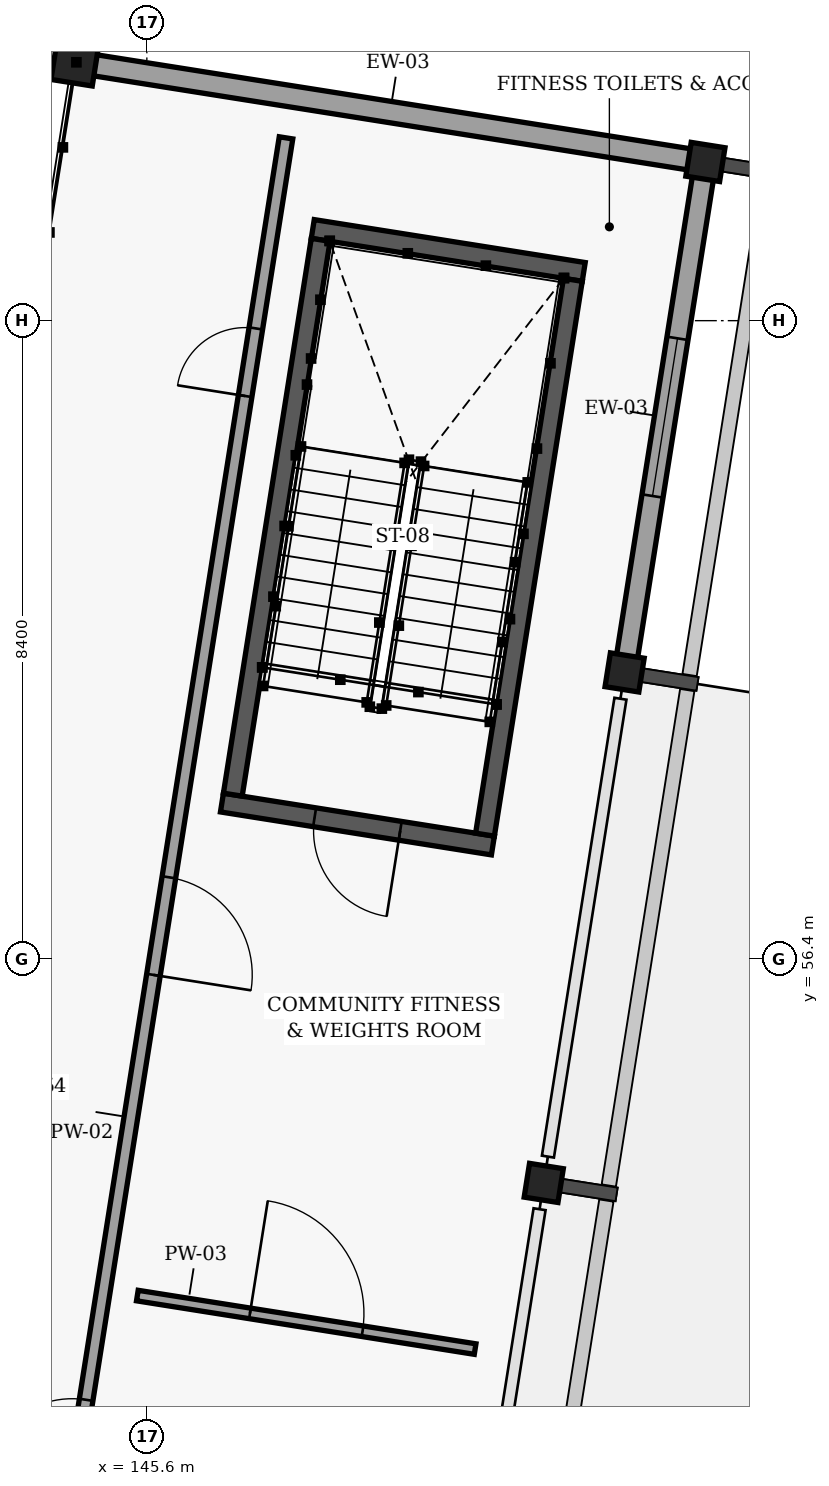
"""IFC4 building model, lengths in metres.
Left out: names, types, materials, properties, quantities, classifications, styles, units other than length and angle.
Written with IfcOpenShell. Run it as: python <this file> out.ifc"""

import sys

from ifc_helpers import new_model, si_unit, direction, frame, frame_2d, origin, origin_2d, place, context, subcontext, project, spatial, rectangle, extrude, element, fill, save


model = new_model("IFC4")
c1 = context("Model", 3, precision=1e-05, world=origin(), true_north=direction((0.0, 1.0)))
c2 = subcontext(c1, "Body", "Model", "MODEL_VIEW")
j1 = project(units=[si_unit("LENGTHUNIT", "METRE"), si_unit("PLANEANGLEUNIT", "RADIAN")], contexts=[c1])
p1 = place(None, origin())
s1 = spatial("IfcSite", under=j1, at=p1, CompositionType="ELEMENT")
p2 = place(p1, origin())
s2 = spatial("IfcBuilding", under=s1, at=p2, CompositionType="ELEMENT")
p3 = place(p2, frame((0.0, 0.0, 4.8)))
s3 = spatial("IfcBuildingStorey", under=s2, at=p3, CompositionType="ELEMENT", Elevation=4.8)
p4 = place(p3, frame((144.653, 68.202, 0.0), z_axis=(0.0, 0.0, 1.0), x_axis=(0.987688340595, -0.15643446504, 0.0)))
e1 = element("IfcColumn", 1, at=p4, inside=s3, PredefinedType="COLUMN", context=c2, shape_type="SweptSolid", body=[
    extrude(rectangle(XDim=0.55, YDim=0.55, at=origin_2d()), origin(), (0.0, 0.0, 1.0), 4.2),
])
for number, where, z_axis, x_axis in (
    (2, (150.822, 53.456, 0.0), (0.0, 0.0, 1.0), (0.988, -0.156, 0.0)),
    (3, (151.886, 60.172, 0.0), (0.0, 0.0, 1.0), (0.988, -0.156, 0.0)),
    (4, (152.949, 66.888, 0.0), (0.0, 0.0, 1.0), (0.988, -0.156, 0.0)),
):
    element("IfcColumn", number, at=place(p3, frame(where, z_axis=z_axis, x_axis=x_axis)), inside=s3, PredefinedType="COLUMN", context=c2, shape_type="SweptSolid", body=[
        extrude(rectangle(XDim=0.45, YDim=0.45, at=origin_2d()), origin(), (0.0, 0.0, 1.0), 4.2),
    ])
p5 = place(p3, frame((151.901, 60.271, 0.0), z_axis=(0.0, 0.0, 1.0), x_axis=(0.156536171909, 0.987672226442, 0.0)))
e5 = element("IfcWall", 5, at=p5, inside=s3, PredefinedType="SOLIDWALL", context=c2, shape_type="SweptSolid", body=[
    extrude(rectangle(XDim=6.6, YDim=0.28, at=frame_2d((3.3, 0.0))), origin(), (0.0, 0.0, 1.0), 3.328),
])
p6 = place(p5, frame((2.25, 0.0, 1.308)))
e6 = element("IfcOpeningElement", 6, at=p6, cuts=e5, PredefinedType="OPENING", context=c2, shape_type="SweptSolid", body=[
    extrude(rectangle(XDim=2.1, YDim=1.8, at=frame_2d((1.05, 0.9))), frame((0.0, 0.15, 0.0), z_axis=(0.0, -1.0, 0.0), x_axis=(1.0, 0.0, 0.0)), (0.0, 0.0, 1.0), 0.3),
])
p7 = place(p3, frame((144.732, 68.189, 0.0), z_axis=(0.0, 0.0, 1.0), x_axis=(0.987704756752, -0.156330782283, 0.0)))
e7 = element("IfcWall", 7, at=p7, inside=s3, PredefinedType="SOLIDWALL", context=c2, shape_type="SweptSolid", body=[
    extrude(rectangle(XDim=8.24, YDim=0.28, at=frame_2d((4.12, 0.0))), origin(), (0.0, 0.0, 1.0), 3.406),
])
p8 = place(p3, frame((144.666, 68.281, 0.0), z_axis=(0.0, 0.0, 1.0), x_axis=(0.15632126228, 0.987706263501, 0.0)))
e8 = element("IfcWall", 8, at=p8, inside=s3, PredefinedType="SOLIDWALL", context=c2, shape_type="SweptSolid", body=[
    extrude(rectangle(XDim=6.641, YDim=0.28, at=frame_2d((3.32, 0.0))), origin(), (0.0, 0.0, 1.0), 3.535),
])
p9 = place(p3, frame((150.153, 57.895, 0.0), z_axis=(0.0, 0.0, 1.0), x_axis=(-0.987676717047, 0.156507835599, 0.0)))
e9 = element("IfcWall", 9, at=p9, inside=s3, PredefinedType="SHEAR", context=c2, shape_type="SweptSolid", body=[
    extrude(rectangle(XDim=3.61, YDim=0.25, at=frame_2d((1.805, 0.0))), origin(), (0.0, 0.0, 1.0), 3.96),
])
p10 = place(p9, frame((1.235, 0.0, 0.0)))
e10 = element("IfcOpeningElement", 10, at=p10, cuts=e9, PredefinedType="OPENING", context=c2, shape_type="SweptSolid", body=[
    extrude(rectangle(XDim=1.14, YDim=2.15, at=frame_2d((0.57, 1.075))), frame((0.0, 0.135, 0.0), z_axis=(0.0, -1.0, 0.0), x_axis=(1.0, 0.0, 0.0)), (0.0, 0.0, 1.0), 0.27),
])
p11 = place(p3, frame((147.783, 66.006, 0.0), z_axis=(0.0, 0.0, 1.0), x_axis=(0.987664601714, -0.156584272906, 0.0)))
e11 = element("IfcWall", 11, at=p11, inside=s3, PredefinedType="SHEAR", context=c2, shape_type="SweptSolid", body=[
    extrude(rectangle(XDim=3.609, YDim=0.25, at=frame_2d((1.805, 0.0))), origin(), (0.0, 0.0, 1.0), 3.96),
])
p12 = place(p3, frame((146.731, 58.564, 0.0), z_axis=(0.0, 0.0, 1.0), x_axis=(0.15642738738, 0.98768946156, 0.0)))
e12 = element("IfcWall", 12, at=p12, inside=s3, PredefinedType="SHEAR", context=c2, shape_type="SweptSolid", body=[
    extrude(rectangle(XDim=7.39, YDim=0.25, at=frame_2d((3.695, 0.0))), origin(), (0.0, 0.0, 1.0), 3.96),
])
p13 = place(p3, frame((151.205, 65.337, 0.0), z_axis=(0.0, 0.0, 1.0), x_axis=(-0.156432491725, -0.987688653136, 0.0)))
e13 = element("IfcWall", 13, at=p13, inside=s3, PredefinedType="SHEAR", context=c2, shape_type="SweptSolid", body=[
    extrude(rectangle(XDim=7.39, YDim=0.25, at=frame_2d((3.695, 0.0))), origin(), (0.0, 0.0, 1.0), 3.96),
])
p14 = place(p3, frame((143.348, 41.427, 0.0), z_axis=(0.0, 0.0, 1.0), x_axis=(0.156440506918, 0.987687383637, 0.0)))
e14 = element("IfcWall", 14, at=p14, inside=s3, PredefinedType="PARTITIONING", context=c2, shape_type="SweptSolid", body=[
    extrude(rectangle(XDim=26.099, YDim=0.18, at=frame_2d((13.05, 0.0))), origin(), (0.0, 0.0, 1.0), 3.406),
])
p15 = place(p14, frame((8.11, 0.0, 0.0)))
e15 = element("IfcOpeningElement", 15, at=p15, cuts=e14, PredefinedType="OPENING", context=c2, shape_type="SweptSolid", body=[
    extrude(rectangle(XDim=1.18, YDim=2.18, at=frame_2d((0.59, 1.09))), frame((0.0, 0.1, 0.0), z_axis=(0.0, -1.0, 0.0), x_axis=(1.0, 0.0, 0.0)), (0.0, 0.0, 1.0), 0.2),
])
p16 = place(p14, frame((14.95, 0.0, 0.0)))
e16 = element("IfcOpeningElement", 16, at=p16, cuts=e14, PredefinedType="OPENING", context=c2, shape_type="SweptSolid", body=[
    extrude(rectangle(XDim=1.3, YDim=2.2, at=frame_2d((0.65, 1.1))), frame((0.0, 0.1, 0.0), z_axis=(0.0, -1.0, 0.0), x_axis=(1.0, 0.0, 0.0)), (0.0, 0.0, 1.0), 0.2),
])
p17 = place(p14, frame((22.661, 0.0, 0.0)))
e17 = element("IfcOpeningElement", 17, at=p17, cuts=e14, PredefinedType="OPENING", context=c2, shape_type="SweptSolid", body=[
    extrude(rectangle(XDim=0.9, YDim=2.06, at=frame_2d((0.45, 1.03))), frame((0.0, 0.1, 0.0), z_axis=(0.0, -1.0, 0.0), x_axis=(1.0, 0.0, 0.0)), (0.0, 0.0, 1.0), 0.2),
])
p18 = place(p3, frame((145.475, 51.974, 0.0), z_axis=(0.0, 0.0, 1.0), x_axis=(0.987679230443, -0.156491973442, 0.0)))
e18 = element("IfcWall", 18, at=p18, inside=s3, PredefinedType="PARTITIONING", context=c2, shape_type="SweptSolid", body=[
    extrude(rectangle(XDim=4.499, YDim=0.14, at=frame_2d((2.25, 0.0))), origin(), (0.0, 0.0, 1.0), 3.535),
])
p19 = place(p18, frame((1.5, 0.0, 0.0)))
e19 = element("IfcOpeningElement", 19, at=p19, cuts=e18, PredefinedType="OPENING", context=c2, shape_type="SweptSolid", body=[
    extrude(rectangle(XDim=1.5, YDim=2.25, at=frame_2d((0.75, 1.125))), frame((0.0, 0.08, 0.0), z_axis=(0.0, -1.0, 0.0), x_axis=(1.0, 0.0, 0.0)), (0.0, 0.0, 1.0), 0.16),
])
p20 = place(p6, origin())
e20 = element("IfcWindow", 20, at=p20, inside=s3, PartitioningType="SINGLE_PANEL", PredefinedType="WINDOW", context=c2, shape_type="SweptSolid", body=[
    extrude(rectangle(XDim=2.1, YDim=1.8, at=frame_2d((1.05, 0.9))), frame((0.0, 0.03, 0.0), z_axis=(0.0, -1.0, 0.0), x_axis=(1.0, 0.0, 0.0)), (0.0, 0.0, 1.0), 0.06),
])
fill(e6, e20)
p21 = place(p10, origin())
e21 = element("IfcDoor", 21, at=p21, inside=s3, OperationType="SINGLE_SWING_LEFT", PredefinedType="DOOR", context=c2, shape_type="SweptSolid", body=[
    extrude(rectangle(XDim=1.14, YDim=2.15, at=frame_2d((0.57, 1.075))), frame((0.0, 0.025, 0.0), z_axis=(0.0, -1.0, 0.0), x_axis=(1.0, 0.0, 0.0)), (0.0, 0.0, 1.0), 0.05),
])
fill(e10, e21)
p22 = place(p15, origin())
e22 = element("IfcDoor", 22, at=p22, inside=s3, OperationType="SINGLE_SWING_LEFT", PredefinedType="DOOR", context=c2, shape_type="SweptSolid", body=[
    extrude(rectangle(XDim=1.18, YDim=2.18, at=frame_2d((0.59, 1.09))), frame((0.0, 0.025, 0.0), z_axis=(0.0, -1.0, 0.0), x_axis=(1.0, 0.0, 0.0)), (0.0, 0.0, 1.0), 0.05),
])
fill(e15, e22)
p23 = place(p16, origin())
e23 = element("IfcDoor", 23, at=p23, inside=s3, OperationType="SINGLE_SWING_RIGHT", PredefinedType="DOOR", context=c2, shape_type="SweptSolid", body=[
    extrude(rectangle(XDim=1.3, YDim=2.2, at=frame_2d((0.65, 1.1))), frame((0.0, 0.025, 0.0), z_axis=(0.0, -1.0, 0.0), x_axis=(1.0, 0.0, 0.0)), (0.0, 0.0, 1.0), 0.05),
])
fill(e16, e23)
p24 = place(p19, origin())
e24 = element("IfcDoor", 24, at=p24, inside=s3, OperationType="DOUBLE_DOOR_SINGLE_SWING", PredefinedType="DOOR", context=c2, shape_type="SweptSolid", body=[
    extrude(rectangle(XDim=1.5, YDim=2.25, at=frame_2d((0.75, 1.125))), frame((0.0, 0.025, 0.0), z_axis=(0.0, -1.0, 0.0), x_axis=(1.0, 0.0, 0.0)), (0.0, 0.0, 1.0), 0.05),
])
fill(e19, e24)
p25 = place(p17, origin())
e25 = element("IfcDoor", 25, at=p25, inside=s3, OperationType="SINGLE_SWING_LEFT", PredefinedType="DOOR", context=c2, shape_type="SweptSolid", body=[
    extrude(rectangle(XDim=0.9, YDim=2.06, at=frame_2d((0.45, 1.03))), frame((0.0, 0.025, 0.0), z_axis=(0.0, -1.0, 0.0), x_axis=(1.0, 0.0, 0.0)), (0.0, 0.0, 1.0), 0.05),
])
fill(e17, e25)
save(model, sys.argv[1])
